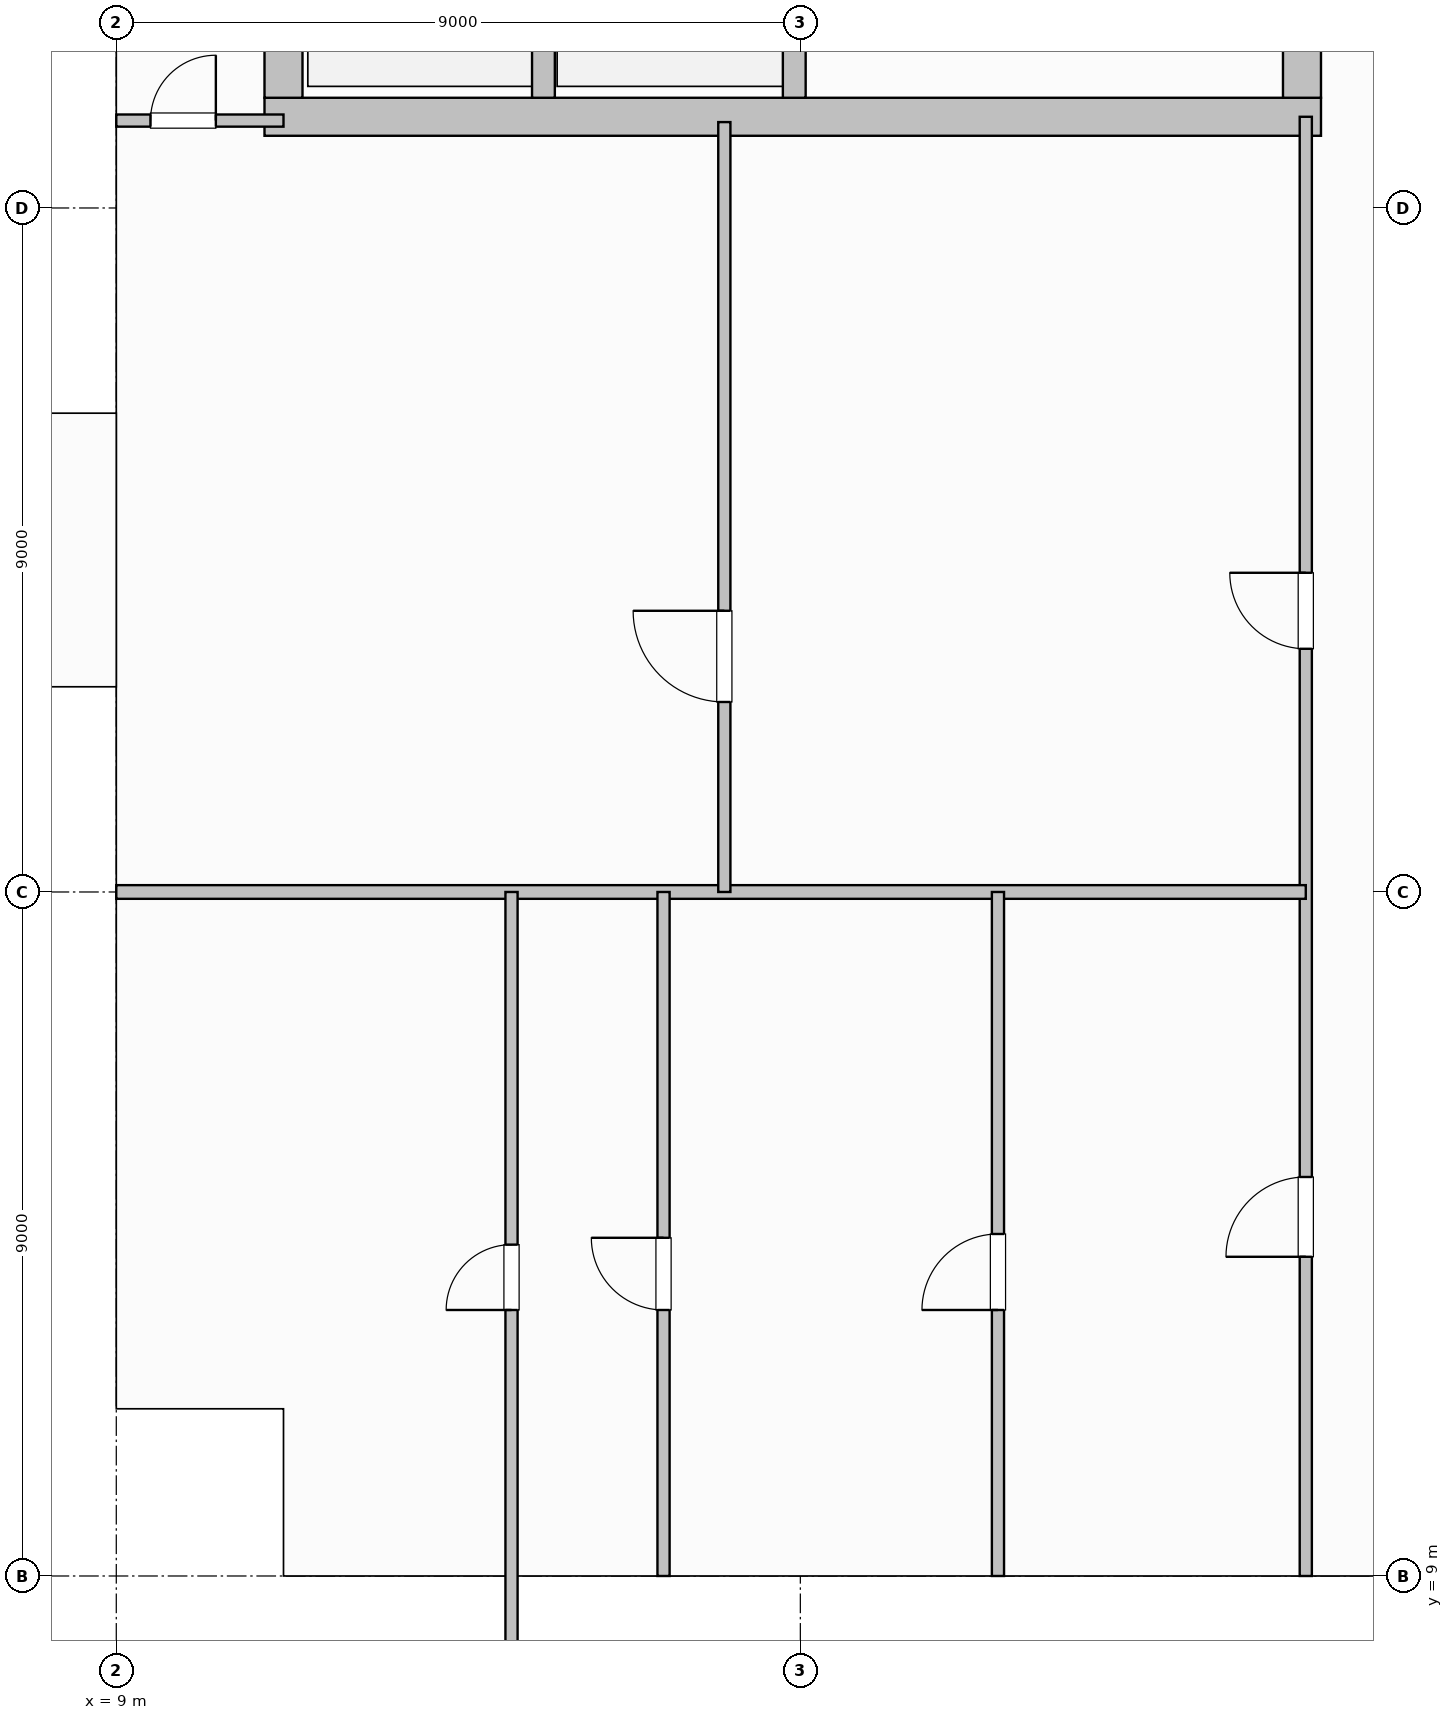
"""IFC4 building model, lengths in metres.
Left out: names, types, materials, properties, quantities, classifications, styles, units other than length and angle.
Written with IfcOpenShell. Run it as: python <this file> out.ifc"""

import sys

from ifc_helpers import new_model, si_unit, direction, frame, frame_2d, origin, origin_2d, place, context, subcontext, project, spatial, rectangle, i_section, extrude, element, fill, save


model = new_model("IFC4")
c1 = context("Model", 3, precision=1e-05, world=origin(), true_north=direction((0.0, 1.0)))
c2 = subcontext(c1, "Body", "Model", "MODEL_VIEW")
j1 = project(units=[si_unit("LENGTHUNIT", "METRE"), si_unit("PLANEANGLEUNIT", "RADIAN")], contexts=[c1])
p1 = place(None, origin())
s1 = spatial("IfcSite", under=j1, at=p1, CompositionType="ELEMENT")
p2 = place(p1, origin())
s2 = spatial("IfcBuilding", under=s1, at=p2, CompositionType="ELEMENT")
p3 = place(p2, frame((0.0, 0.0, 201.2)))
s3 = spatial("IfcBuildingStorey", under=s2, at=p3, CompositionType="ELEMENT", Elevation=201.2)
for number, where, z_axis, x_axis in (
    (1, (9.0, 18.0, 0.0), (0.0, 0.0, 1.0), (1.0, 0.0, 0.0)),
    (2, (9.0, 27.0, 0.0), (0.0, 0.0, 1.0), (1.0, 0.0, 0.0)),
    (3, (18.0, 9.0, 0.0), (0.0, 0.0, 1.0), (1.0, 0.0, 0.0)),
    (4, (18.0, 18.0, 0.0), (0.0, 0.0, 1.0), (1.0, 0.0, 0.0)),
    (5, (18.0, 27.0, 0.0), (0.0, 0.0, 1.0), (1.0, 0.0, 0.0)),
):
    element("IfcColumn", number, at=place(p3, frame(where, z_axis=z_axis, x_axis=x_axis)), inside=s3, PredefinedType="COLUMN", context=c2, shape_type="SweptSolid", body=[
        extrude(i_section(OverallWidth=0.401, OverallDepth=0.399, WebThickness=0.025, FlangeThickness=0.04, FilletRadius=0.015, at=origin_2d()), origin(), (0.0, 0.0, 1.0), 5.0),
    ])
p4 = place(p3, frame((10.95, 28.2, 0.0), z_axis=(0.0, 0.0, 1.0), x_axis=(1.0, 0.0, 0.0)))
e6 = element("IfcWall", 6, at=p4, inside=s3, PredefinedType="SHEAR", context=c2, shape_type="SweptSolid", body=[
    extrude(rectangle(XDim=13.9, YDim=0.5, at=frame_2d((6.95, 0.0))), origin(), (0.0, 0.0, 1.0), 4.72),
])
p5 = place(p3, frame((11.2, 42.15, 0.0), z_axis=(0.0, 0.0, 1.0), x_axis=(0.0, -1.0, 0.0)))
e7 = element("IfcWall", 7, at=p5, inside=s3, PredefinedType="SHEAR", context=c2, shape_type="SweptSolid", body=[
    extrude(rectangle(XDim=13.7, YDim=0.5, at=frame_2d((6.85, 0.0))), origin(), (0.0, 0.0, 1.0), 4.72),
])
p6 = place(p3, frame((24.6, 28.45, 0.0), z_axis=(0.0, 0.0, 1.0), x_axis=(0.0, 1.0, 0.0)))
e8 = element("IfcWall", 8, at=p6, inside=s3, PredefinedType="SHEAR", context=c2, shape_type="SweptSolid", body=[
    extrude(rectangle(XDim=13.7, YDim=0.5, at=frame_2d((6.85, 0.0))), origin(), (0.0, 0.0, 1.0), 4.72),
])
p7 = place(p6, frame((3.35, 0.0, 0.0)))
e9 = element("IfcOpeningElement", 9, at=p7, cuts=e8, PredefinedType="OPENING", context=c2, shape_type="SweptSolid", body=[
    extrude(rectangle(XDim=1.5, YDim=2.2, at=frame_2d((0.75, 1.1))), frame((0.0, 0.26, 0.0), z_axis=(0.0, -1.0, 0.0), x_axis=(1.0, 0.0, 0.0)), (0.0, 0.0, 1.0), 0.52),
])
p8 = place(p6, frame((9.95, 0.0, 0.0)))
e10 = element("IfcOpeningElement", 10, at=p8, cuts=e8, PredefinedType="OPENING", context=c2, shape_type="SweptSolid", body=[
    extrude(rectangle(XDim=0.9, YDim=2.1, at=frame_2d((0.45, 1.05))), frame((0.0, 0.26, 0.0), z_axis=(0.0, -1.0, 0.0), x_axis=(1.0, 0.0, 0.0)), (0.0, 0.0, 1.0), 0.52),
])
p9 = place(p6, frame((12.05, 0.0, 0.0)))
e11 = element("IfcOpeningElement", 11, at=p9, cuts=e8, PredefinedType="OPENING", context=c2, shape_type="SweptSolid", body=[
    extrude(rectangle(XDim=0.9, YDim=2.1, at=frame_2d((0.45, 1.05))), frame((0.0, 0.26, 0.0), z_axis=(0.0, -1.0, 0.0), x_axis=(1.0, 0.0, 0.0)), (0.0, 0.0, 1.0), 0.52),
])
p10 = place(p3, frame((14.62, 28.45, 0.0), z_axis=(0.0, 0.0, 1.0), x_axis=(0.0, 1.0, 0.0)))
e12 = element("IfcWall", 12, at=p10, inside=s3, PredefinedType="SHEAR", context=c2, shape_type="SweptSolid", body=[
    extrude(rectangle(XDim=9.0, YDim=0.3, at=frame_2d((4.5, 0.0))), origin(), (0.0, 0.0, 1.0), 4.72),
])
p11 = place(p3, frame((17.92, 42.15, 0.0), z_axis=(0.0, 0.0, 1.0), x_axis=(0.0, -1.0, 0.0)))
e13 = element("IfcWall", 13, at=p11, inside=s3, PredefinedType="SHEAR", context=c2, shape_type="SweptSolid", body=[
    extrude(rectangle(XDim=13.7, YDim=0.3, at=frame_2d((6.85, 0.0))), origin(), (0.0, 0.0, 1.0), 4.72),
])
p12 = place(p11, frame((1.975, 0.0, 0.0)))
e14 = element("IfcOpeningElement", 14, at=p12, cuts=e13, PredefinedType="OPENING", context=c2, shape_type="SweptSolid", body=[
    extrude(rectangle(XDim=1.15, YDim=2.15, at=frame_2d((0.575, 1.075))), frame((0.0, 0.16, 0.0), z_axis=(0.0, -1.0, 0.0), x_axis=(1.0, 0.0, 0.0)), (0.0, 0.0, 1.0), 0.32),
])
p13 = place(p3, frame((9.0, 28.15, 0.0), z_axis=(0.0, 0.0, 1.0), x_axis=(1.0, 0.0, 0.0)))
e15 = element("IfcWall", 15, at=p13, inside=s3, PredefinedType="PARTITIONING", context=c2, shape_type="SweptSolid", body=[
    extrude(rectangle(XDim=2.2, YDim=0.16, at=frame_2d((1.1, 0.0))), origin(), (0.0, 0.0, 1.0), 4.007),
])
p14 = place(p13, frame((0.45, 0.0, 0.0)))
e16 = element("IfcOpeningElement", 16, at=p14, cuts=e15, PredefinedType="OPENING", context=c2, shape_type="SweptSolid", body=[
    extrude(rectangle(XDim=0.86, YDim=2.05, at=frame_2d((0.43, 1.025))), frame((0.0, 0.09, 0.0), z_axis=(0.0, -1.0, 0.0), x_axis=(1.0, 0.0, 0.0)), (0.0, 0.0, 1.0), 0.18),
])
p15 = place(p3, frame((24.65, 9.0, 0.0), z_axis=(0.0, 0.0, 1.0), x_axis=(0.0, 1.0, 0.0)))
e17 = element("IfcWall", 17, at=p15, inside=s3, PredefinedType="PARTITIONING", context=c2, shape_type="SweptSolid", body=[
    extrude(rectangle(XDim=19.2, YDim=0.16, at=frame_2d((9.6, 0.0))), origin(), (0.0, 0.0, 1.0), 4.007),
])
p16 = place(p15, frame((12.2, 0.0, 0.0)))
e18 = element("IfcOpeningElement", 18, at=p16, cuts=e17, PredefinedType="OPENING", context=c2, shape_type="SweptSolid", body=[
    extrude(rectangle(XDim=1.0, YDim=2.1, at=frame_2d((0.5, 1.05))), frame((0.0, 0.09, 0.0), z_axis=(0.0, -1.0, 0.0), x_axis=(1.0, 0.0, 0.0)), (0.0, 0.0, 1.0), 0.18),
])
p17 = place(p15, frame((4.2, 0.0, 0.0)))
e19 = element("IfcOpeningElement", 19, at=p17, cuts=e17, PredefinedType="OPENING", context=c2, shape_type="SweptSolid", body=[
    extrude(rectangle(XDim=1.05, YDim=2.15, at=frame_2d((0.525, 1.075))), frame((0.0, 0.09, 0.0), z_axis=(0.0, -1.0, 0.0), x_axis=(1.0, 0.0, 0.0)), (0.0, 0.0, 1.0), 0.18),
])
p18 = place(p3, frame((9.0, 18.0, 0.0), z_axis=(0.0, 0.0, 1.0), x_axis=(1.0, 0.0, 0.0)))
e20 = element("IfcWall", 20, at=p18, inside=s3, PredefinedType="PARTITIONING", context=c2, shape_type="SweptSolid", body=[
    extrude(rectangle(XDim=15.65, YDim=0.18, at=frame_2d((7.825, 0.0))), origin(), (0.0, 0.0, 1.0), 4.007),
])
p19 = place(p3, frame((17.0, 18.0, 0.0), z_axis=(0.0, 0.0, 1.0), x_axis=(0.0, 1.0, 0.0)))
e21 = element("IfcWall", 21, at=p19, inside=s3, PredefinedType="PARTITIONING", context=c2, shape_type="SweptSolid", body=[
    extrude(rectangle(XDim=10.13, YDim=0.16, at=frame_2d((5.065, 0.0))), origin(), (0.0, 0.0, 1.0), 4.089),
])
p20 = place(p19, frame((2.5, 0.0, 0.0)))
e22 = element("IfcOpeningElement", 22, at=p20, cuts=e21, PredefinedType="OPENING", context=c2, shape_type="SweptSolid", body=[
    extrude(rectangle(XDim=1.2, YDim=2.15, at=frame_2d((0.6, 1.075))), frame((0.0, 0.09, 0.0), z_axis=(0.0, -1.0, 0.0), x_axis=(1.0, 0.0, 0.0)), (0.0, 0.0, 1.0), 0.18),
])
p21 = place(p3, frame((14.2, 7.987, 0.0), z_axis=(0.0, 0.0, 1.0), x_axis=(0.0, 1.0, 0.0)))
e23 = element("IfcWall", 23, at=p21, inside=s3, PredefinedType="PARTITIONING", context=c2, shape_type="SweptSolid", body=[
    extrude(rectangle(XDim=10.013, YDim=0.16, at=frame_2d((5.006, 0.0))), origin(), (0.0, 0.0, 1.0), 4.089),
])
p22 = place(p21, frame((4.513, 0.0, 0.0)))
e24 = element("IfcOpeningElement", 24, at=p22, cuts=e23, PredefinedType="OPENING", context=c2, shape_type="SweptSolid", body=[
    extrude(rectangle(XDim=0.86, YDim=2.05, at=frame_2d((0.43, 1.025))), frame((0.0, 0.09, 0.0), z_axis=(0.0, -1.0, 0.0), x_axis=(1.0, 0.0, 0.0)), (0.0, 0.0, 1.0), 0.18),
])
p23 = place(p3, frame((16.2, 9.0, 0.0), z_axis=(0.0, 0.0, 1.0), x_axis=(0.0, 1.0, 0.0)))
e25 = element("IfcWall", 25, at=p23, inside=s3, PredefinedType="PARTITIONING", context=c2, shape_type="SweptSolid", body=[
    extrude(rectangle(XDim=9.0, YDim=0.16, at=frame_2d((4.5, 0.0))), origin(), (0.0, 0.0, 1.0), 4.089),
])
p24 = place(p23, frame((3.5, 0.0, 0.0)))
e26 = element("IfcOpeningElement", 26, at=p24, cuts=e25, PredefinedType="OPENING", context=c2, shape_type="SweptSolid", body=[
    extrude(rectangle(XDim=0.95, YDim=2.1, at=frame_2d((0.475, 1.05))), frame((0.0, 0.09, 0.0), z_axis=(0.0, -1.0, 0.0), x_axis=(1.0, 0.0, 0.0)), (0.0, 0.0, 1.0), 0.18),
])
p25 = place(p3, frame((20.6, 9.0, 0.0), z_axis=(0.0, 0.0, 1.0), x_axis=(0.0, 1.0, 0.0)))
e27 = element("IfcWall", 27, at=p25, inside=s3, PredefinedType="PARTITIONING", context=c2, shape_type="SweptSolid", body=[
    extrude(rectangle(XDim=9.0, YDim=0.16, at=frame_2d((4.5, 0.0))), origin(), (0.0, 0.0, 1.0), 4.007),
])
p26 = place(p25, frame((3.5, 0.0, 0.0)))
e28 = element("IfcOpeningElement", 28, at=p26, cuts=e27, PredefinedType="OPENING", context=c2, shape_type="SweptSolid", body=[
    extrude(rectangle(XDim=1.0, YDim=2.1, at=frame_2d((0.5, 1.05))), frame((0.0, 0.09, 0.0), z_axis=(0.0, -1.0, 0.0), x_axis=(1.0, 0.0, 0.0)), (0.0, 0.0, 1.0), 0.18),
])
p27 = place(p14, origin())
e29 = element("IfcDoor", 29, at=p27, inside=s3, OperationType="SINGLE_SWING_RIGHT", PredefinedType="DOOR", context=c2, shape_type="SweptSolid", body=[
    extrude(rectangle(XDim=0.86, YDim=2.05, at=frame_2d((0.43, 1.025))), frame((0.0, 0.025, 0.0), z_axis=(0.0, -1.0, 0.0), x_axis=(1.0, 0.0, 0.0)), (0.0, 0.0, 1.0), 0.05),
])
fill(e16, e29)
p28 = place(p16, origin())
e30 = element("IfcDoor", 30, at=p28, inside=s3, OperationType="SINGLE_SWING_RIGHT", PredefinedType="DOOR", context=c2, shape_type="SweptSolid", body=[
    extrude(rectangle(XDim=1.0, YDim=2.1, at=frame_2d((0.5, 1.05))), frame((0.0, 0.025, 0.0), z_axis=(0.0, -1.0, 0.0), x_axis=(1.0, 0.0, 0.0)), (0.0, 0.0, 1.0), 0.05),
])
fill(e18, e30)
p29 = place(p17, origin())
e31 = element("IfcDoor", 31, at=p29, inside=s3, OperationType="SINGLE_SWING_LEFT", PredefinedType="DOOR", context=c2, shape_type="SweptSolid", body=[
    extrude(rectangle(XDim=1.05, YDim=2.15, at=frame_2d((0.525, 1.075))), frame((0.0, 0.025, 0.0), z_axis=(0.0, -1.0, 0.0), x_axis=(1.0, 0.0, 0.0)), (0.0, 0.0, 1.0), 0.05),
])
fill(e19, e31)
p30 = place(p20, origin())
e32 = element("IfcDoor", 32, at=p30, inside=s3, OperationType="SINGLE_SWING_RIGHT", PredefinedType="DOOR", context=c2, shape_type="SweptSolid", body=[
    extrude(rectangle(XDim=1.2, YDim=2.15, at=frame_2d((0.6, 1.075))), frame((0.0, 0.025, 0.0), z_axis=(0.0, -1.0, 0.0), x_axis=(1.0, 0.0, 0.0)), (0.0, 0.0, 1.0), 0.05),
])
fill(e22, e32)
p31 = place(p22, origin())
e33 = element("IfcDoor", 33, at=p31, inside=s3, OperationType="SINGLE_SWING_LEFT", PredefinedType="DOOR", context=c2, shape_type="SweptSolid", body=[
    extrude(rectangle(XDim=0.86, YDim=2.05, at=frame_2d((0.43, 1.025))), frame((0.0, 0.025, 0.0), z_axis=(0.0, -1.0, 0.0), x_axis=(1.0, 0.0, 0.0)), (0.0, 0.0, 1.0), 0.05),
])
fill(e24, e33)
p32 = place(p24, origin())
e34 = element("IfcDoor", 34, at=p32, inside=s3, OperationType="SINGLE_SWING_RIGHT", PredefinedType="DOOR", context=c2, shape_type="SweptSolid", body=[
    extrude(rectangle(XDim=0.95, YDim=2.1, at=frame_2d((0.475, 1.05))), frame((0.0, 0.025, 0.0), z_axis=(0.0, -1.0, 0.0), x_axis=(1.0, 0.0, 0.0)), (0.0, 0.0, 1.0), 0.05),
])
fill(e26, e34)
p33 = place(p26, origin())
e35 = element("IfcDoor", 35, at=p33, inside=s3, OperationType="SINGLE_SWING_LEFT", PredefinedType="DOOR", context=c2, shape_type="SweptSolid", body=[
    extrude(rectangle(XDim=1.0, YDim=2.1, at=frame_2d((0.5, 1.05))), frame((0.0, 0.025, 0.0), z_axis=(0.0, -1.0, 0.0), x_axis=(1.0, 0.0, 0.0)), (0.0, 0.0, 1.0), 0.05),
])
fill(e28, e35)
save(model, sys.argv[1])
